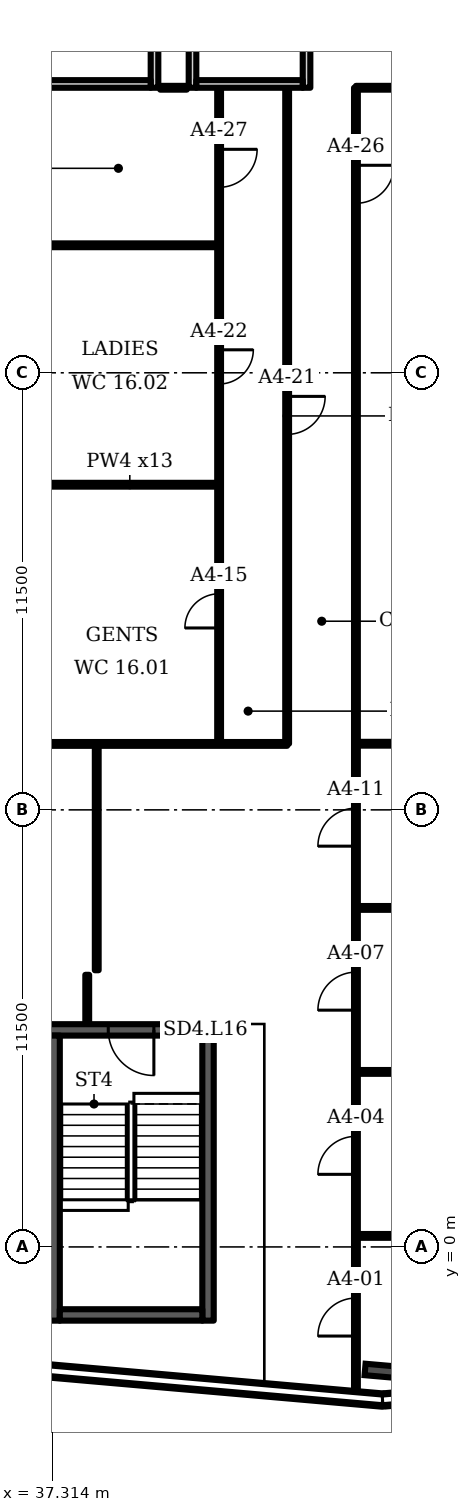
"""IFC4 building model, lengths in metres.
Left out: names, types, materials, properties, quantities, classifications, styles, units other than length and angle.
Written with IfcOpenShell. Run it as: python <this file> out.ifc"""

import sys

from ifc_helpers import new_model, si_unit, direction, frame, frame_2d, origin, origin_2d, place, context, subcontext, project, spatial, rectangle, i_section, extrude, element, fill, save


model = new_model("IFC4")
c1 = context("Model", 3, precision=1e-05, world=origin(), true_north=direction((0.0, 1.0)))
c2 = subcontext(c1, "Body", "Model", "MODEL_VIEW")
j1 = project(units=[si_unit("LENGTHUNIT", "METRE"), si_unit("PLANEANGLEUNIT", "RADIAN")], contexts=[c1])
p1 = place(None, origin())
s1 = spatial("IfcSite", under=j1, at=p1, CompositionType="ELEMENT")
p2 = place(p1, origin())
s2 = spatial("IfcBuilding", under=s1, at=p2, CompositionType="ELEMENT")
p3 = place(p2, frame((0.0, 0.0, 77.5)))
s3 = spatial("IfcBuildingStorey", under=s2, at=p3, CompositionType="ELEMENT", Elevation=77.5)
p4 = place(p3, frame((46.042, -3.268, 0.0), z_axis=(0.0, 0.0, 1.0), x_axis=(-0.087156, -0.996198, 0.0)))
e1 = element("IfcColumn", 1, at=p4, inside=s3, PredefinedType="COLUMN", context=c2, shape_type="SweptSolid", body=[
    extrude(i_section(OverallWidth=0.302, OverallDepth=1.008, WebThickness=0.021, FlangeThickness=0.04, FilletRadius=0.03, at=origin_2d()), origin(), (0.0, 0.0, 1.0), 3.6),
])
p5 = place(p3, frame((34.601, -3.032, 0.0), z_axis=(0.0, 0.0, 1.0), x_axis=(0.996193, -0.087148, 0.0)))
e2 = element("IfcWall", 2, at=p5, inside=s3, PredefinedType="SOLIDWALL", context=c2, shape_type="SweptSolid", body=[
    extrude(rectangle(XDim=11.458, YDim=0.35, at=frame_2d((5.729, 0.0))), origin(), (0.0, 0.0, 1.0), 1.0),
])
p6 = place(p3, frame((46.045, -4.026, 0.0), z_axis=(0.0, 0.0, 1.0), x_axis=(0.99619, 0.087163, 0.0)))
e3 = element("IfcWall", 3, at=p6, inside=s3, PredefinedType="SOLIDWALL", context=c2, shape_type="SweptSolid", body=[
    extrude(rectangle(XDim=23.013, YDim=0.35, at=frame_2d((11.506, 0.0))), origin(), (0.0, 0.0, 1.0), 1.0),
])
p7 = place(p3, frame((40.0, 30.5, 0.0), z_axis=(0.0, 0.0, 1.0), x_axis=(0.0, 1.0, 0.0)))
e4 = element("IfcWall", 4, at=p7, inside=s3, PredefinedType="PARTITIONING", context=c2, shape_type="SweptSolid", body=[
    extrude(rectangle(XDim=3.5, YDim=0.2, at=frame_2d((1.75, 0.0))), origin(), (0.0, 0.0, 1.0), 3.2),
])
p8 = place(p3, frame((37.1, 30.6, 0.0), z_axis=(0.0, 0.0, 1.0), x_axis=(1.0, 0.0, 0.0)))
e5 = element("IfcWall", 5, at=p8, inside=s3, PredefinedType="PARTITIONING", context=c2, shape_type="SweptSolid", body=[
    extrude(rectangle(XDim=2.8, YDim=0.2, at=frame_2d((1.4, 0.0))), origin(), (0.0, 0.0, 1.0), 3.2),
])
p9 = place(p3, frame((41.0, 30.5, 0.0), z_axis=(0.0, 0.0, 1.0), x_axis=(0.0, 1.0, 0.0)))
e6 = element("IfcWall", 6, at=p9, inside=s3, PredefinedType="PARTITIONING", context=c2, shape_type="SweptSolid", body=[
    extrude(rectangle(XDim=3.5, YDim=0.2, at=frame_2d((1.75, 0.0))), origin(), (0.0, 0.0, 1.0), 3.2),
])
p10 = place(p3, frame((44.0, 30.5, 0.0), z_axis=(0.0, 0.0, 1.0), x_axis=(0.0, 1.0, 0.0)))
e7 = element("IfcWall", 7, at=p10, inside=s3, PredefinedType="PARTITIONING", context=c2, shape_type="SweptSolid", body=[
    extrude(rectangle(XDim=3.5, YDim=0.2, at=frame_2d((1.75, 0.0))), origin(), (0.0, 0.0, 1.0), 3.2),
])
p11 = place(p10, frame((1.2, 0.0, 0.0)))
e8 = element("IfcOpeningElement", 8, at=p11, cuts=e7, PredefinedType="OPENING", context=c2, shape_type="SweptSolid", body=[
    extrude(rectangle(XDim=1.1, YDim=2.1, at=frame_2d((0.55, 1.05))), frame((0.0, 0.11, 0.0), z_axis=(0.0, -1.0, 0.0), x_axis=(1.0, 0.0, 0.0)), (0.0, 0.0, 1.0), 0.22),
])
p12 = place(p3, frame((41.1, 30.6, 0.0), z_axis=(0.0, 0.0, 1.0), x_axis=(1.0, 0.0, 0.0)))
e9 = element("IfcWall", 9, at=p12, inside=s3, PredefinedType="PARTITIONING", context=c2, shape_type="SweptSolid", body=[
    extrude(rectangle(XDim=2.8, YDim=0.2, at=frame_2d((1.4, 0.0))), origin(), (0.0, 0.0, 1.0), 3.2),
])
p13 = place(p3, frame((37.208, 5.711, 0.0), z_axis=(0.0, 0.0, 1.0), x_axis=(1.0, 0.0, 0.0)))
e10 = element("IfcWall", 10, at=p13, inside=s3, PredefinedType="SHEAR", context=c2, shape_type="SweptSolid", body=[
    extrude(rectangle(XDim=4.35, YDim=0.3, at=frame_2d((2.175, 0.0))), origin(), (0.0, 0.0, 1.0), 3.2),
])
p14 = place(p13, frame((1.575, 0.0, 0.0)))
e11 = element("IfcOpeningElement", 11, at=p14, cuts=e10, PredefinedType="OPENING", context=c2, shape_type="SweptSolid", body=[
    extrude(rectangle(XDim=1.2, YDim=2.1, at=frame_2d((0.6, 1.05))), frame((0.0, 0.16, 0.0), z_axis=(0.0, -1.0, 0.0), x_axis=(1.0, 0.0, 0.0)), (0.0, 0.0, 1.0), 0.32),
])
p15 = place(p3, frame((37.0, 13.235, 0.0), z_axis=(0.0, 0.0, 1.0), x_axis=(1.0, 0.0, 0.0)))
e12 = element("IfcWall", 12, at=p15, inside=s3, PredefinedType="PARTITIONING", context=c2, shape_type="SweptSolid", body=[
    extrude(rectangle(XDim=6.49, YDim=0.1, at=frame_2d((3.245, 0.0))), origin(), (0.0, 0.0, 1.0), 3.2),
])
for number, where, z_axis, x_axis in (
    (13, (37.0, 20.055, 0.0), (0.0, 0.0, 1.0), (1.0, 0.0, 0.0)),
    (14, (37.0, 26.355, 0.0), (0.0, 0.0, 1.0), (1.0, 0.0, 0.0)),
):
    element("IfcWall", number, at=place(p3, frame(where, z_axis=z_axis, x_axis=x_axis)), inside=s3, PredefinedType="PARTITIONING", context=c2, shape_type="SweptSolid", body=[
        extrude(rectangle(XDim=4.7, YDim=0.1, at=frame_2d((2.35, 0.0))), origin(), (0.0, 0.0, 1.0), 3.2),
    ])
p16 = place(p3, frame((38.23, 5.881, 0.0), z_axis=(0.0, 0.0, 1.0), x_axis=(0.0, 1.0, 0.0)))
e15 = element("IfcWall", 15, at=p16, inside=s3, PredefinedType="PARTITIONING", context=c2, shape_type="SweptSolid", body=[
    extrude(rectangle(XDim=1.279, YDim=0.1, at=frame_2d((0.64, 0.0))), origin(), (0.0, 0.0, 1.0), 3.2),
])
p17 = place(p3, frame((38.48, 7.28, 0.0), z_axis=(0.0, 0.0, 1.0), x_axis=(0.0, 1.0, 0.0)))
e16 = element("IfcWall", 16, at=p17, inside=s3, PredefinedType="PARTITIONING", context=c2, shape_type="SweptSolid", body=[
    extrude(rectangle(XDim=5.955, YDim=0.1, at=frame_2d((2.978, 0.0))), origin(), (0.0, 0.0, 1.0), 3.2),
])
p18 = place(p3, frame((41.7, 13.24, 0.0), z_axis=(0.0, 0.0, 1.0), x_axis=(0.0, 1.0, 0.0)))
e17 = element("IfcWall", 17, at=p18, inside=s3, PredefinedType="PARTITIONING", context=c2, shape_type="SweptSolid", body=[
    extrude(rectangle(XDim=17.25, YDim=0.1, at=frame_2d((8.625, 0.0))), origin(), (0.0, 0.0, 1.0), 3.2),
])
p19 = place(p18, frame((3.046, 0.0, 0.0)))
e18 = element("IfcOpeningElement", 18, at=p19, cuts=e17, PredefinedType="OPENING", context=c2, shape_type="SweptSolid", body=[
    extrude(rectangle(XDim=0.9, YDim=2.1, at=frame_2d((0.45, 1.05))), frame((0.0, 0.06, 0.0), z_axis=(0.0, -1.0, 0.0), x_axis=(1.0, 0.0, 0.0)), (0.0, 0.0, 1.0), 0.12),
])
p20 = place(p18, frame((9.465, 0.0, 0.0)))
e19 = element("IfcOpeningElement", 19, at=p20, cuts=e17, PredefinedType="OPENING", context=c2, shape_type="SweptSolid", body=[
    extrude(rectangle(XDim=0.9, YDim=2.1, at=frame_2d((0.45, 1.05))), frame((0.0, 0.06, 0.0), z_axis=(0.0, -1.0, 0.0), x_axis=(1.0, 0.0, 0.0)), (0.0, 0.0, 1.0), 0.12),
])
p21 = place(p18, frame((14.64, 0.0, 0.0)))
e20 = element("IfcOpeningElement", 20, at=p21, cuts=e17, PredefinedType="OPENING", context=c2, shape_type="SweptSolid", body=[
    extrude(rectangle(XDim=1.0, YDim=2.1, at=frame_2d((0.5, 1.05))), frame((0.0, 0.06, 0.0), z_axis=(0.0, -1.0, 0.0), x_axis=(1.0, 0.0, 0.0)), (0.0, 0.0, 1.0), 0.12),
])
p22 = place(p3, frame((43.49, 13.24, 0.0), z_axis=(0.0, 0.0, 1.0), x_axis=(0.0, 1.0, 0.0)))
e21 = element("IfcWall", 21, at=p22, inside=s3, PredefinedType="PARTITIONING", context=c2, shape_type="SweptSolid", body=[
    extrude(rectangle(XDim=17.25, YDim=0.1, at=frame_2d((8.625, 0.0))), origin(), (0.0, 0.0, 1.0), 3.2),
])
p23 = place(p22, frame((8.139, 0.0, 0.0)))
e22 = element("IfcOpeningElement", 22, at=p23, cuts=e21, PredefinedType="OPENING", context=c2, shape_type="SweptSolid", body=[
    extrude(rectangle(XDim=1.0, YDim=2.1, at=frame_2d((0.5, 1.05))), frame((0.0, 0.06, 0.0), z_axis=(0.0, -1.0, 0.0), x_axis=(1.0, 0.0, 0.0)), (0.0, 0.0, 1.0), 0.12),
])
p24 = place(p3, frame((45.3, -3.943, 0.0), z_axis=(0.0, 0.0, 1.0), x_axis=(0.0, 1.0, 0.0)))
e23 = element("IfcWall", 23, at=p24, inside=s3, PredefinedType="PARTITIONING", context=c2, shape_type="SweptSolid", body=[
    extrude(rectangle(XDim=34.443, YDim=0.1, at=frame_2d((17.222, 0.0))), origin(), (0.0, 0.0, 1.0), 2.58),
])
p25 = place(p24, frame((1.598, 0.0, 0.0)))
e24 = element("IfcOpeningElement", 24, at=p25, cuts=e23, PredefinedType="OPENING", context=c2, shape_type="SweptSolid", body=[
    extrude(rectangle(XDim=1.0, YDim=2.1, at=frame_2d((0.5, 1.05))), frame((0.0, 0.06, 0.0), z_axis=(0.0, -1.0, 0.0), x_axis=(1.0, 0.0, 0.0)), (0.0, 0.0, 1.0), 0.12),
])
p26 = place(p24, frame((5.853, 0.0, 0.0)))
e25 = element("IfcOpeningElement", 25, at=p26, cuts=e23, PredefinedType="OPENING", context=c2, shape_type="SweptSolid", body=[
    extrude(rectangle(XDim=1.0, YDim=2.1, at=frame_2d((0.5, 1.05))), frame((0.0, 0.06, 0.0), z_axis=(0.0, -1.0, 0.0), x_axis=(1.0, 0.0, 0.0)), (0.0, 0.0, 1.0), 0.12),
])
p27 = place(p24, frame((10.173, 0.0, 0.0)))
e26 = element("IfcOpeningElement", 26, at=p27, cuts=e23, PredefinedType="OPENING", context=c2, shape_type="SweptSolid", body=[
    extrude(rectangle(XDim=1.0, YDim=2.1, at=frame_2d((0.5, 1.05))), frame((0.0, 0.06, 0.0), z_axis=(0.0, -1.0, 0.0), x_axis=(1.0, 0.0, 0.0)), (0.0, 0.0, 1.0), 0.12),
])
p28 = place(p24, frame((14.488, 0.0, 0.0)))
e27 = element("IfcOpeningElement", 27, at=p28, cuts=e23, PredefinedType="OPENING", context=c2, shape_type="SweptSolid", body=[
    extrude(rectangle(XDim=1.0, YDim=2.1, at=frame_2d((0.5, 1.05))), frame((0.0, 0.06, 0.0), z_axis=(0.0, -1.0, 0.0), x_axis=(1.0, 0.0, 0.0)), (0.0, 0.0, 1.0), 0.12),
])
p29 = place(p24, frame((31.403, 0.0, 0.0)))
e28 = element("IfcOpeningElement", 28, at=p29, cuts=e23, PredefinedType="OPENING", context=c2, shape_type="SweptSolid", body=[
    extrude(rectangle(XDim=1.0, YDim=2.1, at=frame_2d((0.5, 1.05))), frame((0.0, 0.06, 0.0), z_axis=(0.0, -1.0, 0.0), x_axis=(1.0, 0.0, 0.0)), (0.0, 0.0, 1.0), 0.12),
])
for number, where, z_axis, x_axis in (
    (29, (45.3, 0.29, 0.0), (0.0, 0.0, 1.0), (1.0, 0.0, 0.0)),
    (30, (45.3, 4.605, 0.0), (0.0, 0.0, 1.0), (1.0, 0.0, 0.0)),
    (31, (45.3, 8.92, 0.0), (0.0, 0.0, 1.0), (1.0, 0.0, 0.0)),
):
    element("IfcWall", number, at=place(p3, frame(where, z_axis=z_axis, x_axis=x_axis)), inside=s3, PredefinedType="PARTITIONING", context=c2, shape_type="SweptSolid", body=[
        extrude(rectangle(XDim=17.95, YDim=0.1, at=frame_2d((8.975, 0.0))), origin(), (0.0, 0.0, 1.0), 3.2),
    ])
p30 = place(p3, frame((45.3, 13.24, 0.0), z_axis=(0.0, 0.0, 1.0), x_axis=(1.0, 0.0, 0.0)))
e32 = element("IfcWall", 32, at=p30, inside=s3, PredefinedType="PARTITIONING", context=c2, shape_type="SweptSolid", body=[
    extrude(rectangle(XDim=27.56, YDim=0.1, at=frame_2d((13.78, 0.0))), origin(), (0.0, 0.0, 1.0), 3.2),
])
p31 = place(p3, frame((45.3, 30.5, 0.0), z_axis=(0.0, 0.0, 1.0), x_axis=(1.0, 0.0, 0.0)))
e33 = element("IfcWall", 33, at=p31, inside=s3, PredefinedType="PARTITIONING", context=c2, shape_type="SweptSolid", body=[
    extrude(rectangle(XDim=19.7, YDim=0.1, at=frame_2d((9.85, 0.0))), origin(), (0.0, 0.0, 1.0), 3.2),
])
p32 = place(p3, frame((40.15, 30.5, 0.0), z_axis=(0.0, 0.0, 1.0), x_axis=(1.0, 0.0, 0.0)))
e34 = element("IfcWall", 34, at=p32, inside=s3, PredefinedType="PARTITIONING", context=c2, shape_type="SweptSolid", body=[
    extrude(rectangle(XDim=0.7, YDim=0.1, at=frame_2d((0.35, 0.0))), origin(), (0.0, 0.0, 1.0), 3.2),
])
for number, where, z_axis, x_axis in (
    (35, (37.358, -1.939, 0.0), (0.0, 0.0, 1.0), (0.0, 1.0, 0.0)),
    (36, (41.408, -1.939, 0.0), (0.0, 0.0, 1.0), (0.0, 1.0, 0.0)),
):
    element("IfcWall", number, at=place(p3, frame(where, z_axis=z_axis, x_axis=x_axis)), inside=s3, PredefinedType="SHEAR", context=c2, shape_type="SweptSolid", body=[
        extrude(rectangle(XDim=7.5, YDim=0.3, at=frame_2d((3.75, 0.0))), origin(), (0.0, 0.0, 1.0), 3.2),
    ])
p33 = place(p3, frame((37.508, -1.789, 0.0), z_axis=(0.0, 0.0, 1.0), x_axis=(1.0, 0.0, 0.0)))
e37 = element("IfcWall", 37, at=p33, inside=s3, PredefinedType="SHEAR", context=c2, shape_type="SweptSolid", body=[
    extrude(rectangle(XDim=3.75, YDim=0.3, at=frame_2d((1.875, 0.0))), origin(), (0.0, 0.0, 1.0), 3.2),
])
p34 = place(p14, origin())
e38 = element("IfcDoor", 38, at=p34, inside=s3, OperationType="SINGLE_SWING_RIGHT", PredefinedType="DOOR", context=c2, shape_type="SweptSolid", body=[
    extrude(rectangle(XDim=1.2, YDim=2.1, at=frame_2d((0.6, 1.05))), frame((0.0, 0.025, 0.0), z_axis=(0.0, -1.0, 0.0), x_axis=(1.0, 0.0, 0.0)), (0.0, 0.0, 1.0), 0.05),
])
fill(e11, e38)
p35 = place(p25, origin())
e39 = element("IfcDoor", 39, at=p35, inside=s3, OperationType="SINGLE_SWING_LEFT", PredefinedType="DOOR", context=c2, shape_type="SweptSolid", body=[
    extrude(rectangle(XDim=1.0, YDim=2.1, at=frame_2d((0.5, 1.05))), frame((0.0, 0.025, 0.0), z_axis=(0.0, -1.0, 0.0), x_axis=(1.0, 0.0, 0.0)), (0.0, 0.0, 1.0), 0.05),
])
fill(e24, e39)
p36 = place(p26, origin())
e40 = element("IfcDoor", 40, at=p36, inside=s3, OperationType="SINGLE_SWING_LEFT", PredefinedType="DOOR", context=c2, shape_type="SweptSolid", body=[
    extrude(rectangle(XDim=1.0, YDim=2.1, at=frame_2d((0.5, 1.05))), frame((0.0, 0.025, 0.0), z_axis=(0.0, -1.0, 0.0), x_axis=(1.0, 0.0, 0.0)), (0.0, 0.0, 1.0), 0.05),
])
fill(e25, e40)
p37 = place(p27, origin())
e41 = element("IfcDoor", 41, at=p37, inside=s3, OperationType="SINGLE_SWING_LEFT", PredefinedType="DOOR", context=c2, shape_type="SweptSolid", body=[
    extrude(rectangle(XDim=1.0, YDim=2.1, at=frame_2d((0.5, 1.05))), frame((0.0, 0.025, 0.0), z_axis=(0.0, -1.0, 0.0), x_axis=(1.0, 0.0, 0.0)), (0.0, 0.0, 1.0), 0.05),
])
fill(e26, e41)
p38 = place(p28, origin())
e42 = element("IfcDoor", 42, at=p38, inside=s3, OperationType="SINGLE_SWING_LEFT", PredefinedType="DOOR", context=c2, shape_type="SweptSolid", body=[
    extrude(rectangle(XDim=1.0, YDim=2.1, at=frame_2d((0.5, 1.05))), frame((0.0, 0.025, 0.0), z_axis=(0.0, -1.0, 0.0), x_axis=(1.0, 0.0, 0.0)), (0.0, 0.0, 1.0), 0.05),
])
fill(e27, e42)
p39 = place(p19, origin())
e43 = element("IfcDoor", 43, at=p39, inside=s3, OperationType="SINGLE_SWING_LEFT", PredefinedType="DOOR", context=c2, shape_type="SweptSolid", body=[
    extrude(rectangle(XDim=0.9, YDim=2.1, at=frame_2d((0.45, 1.05))), frame((0.0, 0.025, 0.0), z_axis=(0.0, -1.0, 0.0), x_axis=(1.0, 0.0, 0.0)), (0.0, 0.0, 1.0), 0.05),
])
fill(e18, e43)
p40 = place(p23, origin())
e44 = element("IfcDoor", 44, at=p40, inside=s3, OperationType="SINGLE_SWING_RIGHT", PredefinedType="DOOR", context=c2, shape_type="SweptSolid", body=[
    extrude(rectangle(XDim=1.0, YDim=2.1, at=frame_2d((0.5, 1.05))), frame((0.0, 0.025, 0.0), z_axis=(0.0, -1.0, 0.0), x_axis=(1.0, 0.0, 0.0)), (0.0, 0.0, 1.0), 0.05),
])
fill(e22, e44)
p41 = place(p20, origin())
e45 = element("IfcDoor", 45, at=p41, inside=s3, OperationType="SINGLE_SWING_RIGHT", PredefinedType="DOOR", context=c2, shape_type="SweptSolid", body=[
    extrude(rectangle(XDim=0.9, YDim=2.1, at=frame_2d((0.45, 1.05))), frame((0.0, 0.025, 0.0), z_axis=(0.0, -1.0, 0.0), x_axis=(1.0, 0.0, 0.0)), (0.0, 0.0, 1.0), 0.05),
])
fill(e19, e45)
p42 = place(p29, origin())
e46 = element("IfcDoor", 46, at=p42, inside=s3, OperationType="SINGLE_SWING_RIGHT", PredefinedType="DOOR", context=c2, shape_type="SweptSolid", body=[
    extrude(rectangle(XDim=1.0, YDim=2.1, at=frame_2d((0.5, 1.05))), frame((0.0, 0.025, 0.0), z_axis=(0.0, -1.0, 0.0), x_axis=(1.0, 0.0, 0.0)), (0.0, 0.0, 1.0), 0.05),
])
fill(e28, e46)
p43 = place(p21, origin())
e47 = element("IfcDoor", 47, at=p43, inside=s3, OperationType="SINGLE_SWING_RIGHT", PredefinedType="DOOR", context=c2, shape_type="SweptSolid", body=[
    extrude(rectangle(XDim=1.0, YDim=2.1, at=frame_2d((0.5, 1.05))), frame((0.0, 0.025, 0.0), z_axis=(0.0, -1.0, 0.0), x_axis=(1.0, 0.0, 0.0)), (0.0, 0.0, 1.0), 0.05),
])
fill(e20, e47)
save(model, sys.argv[1])
